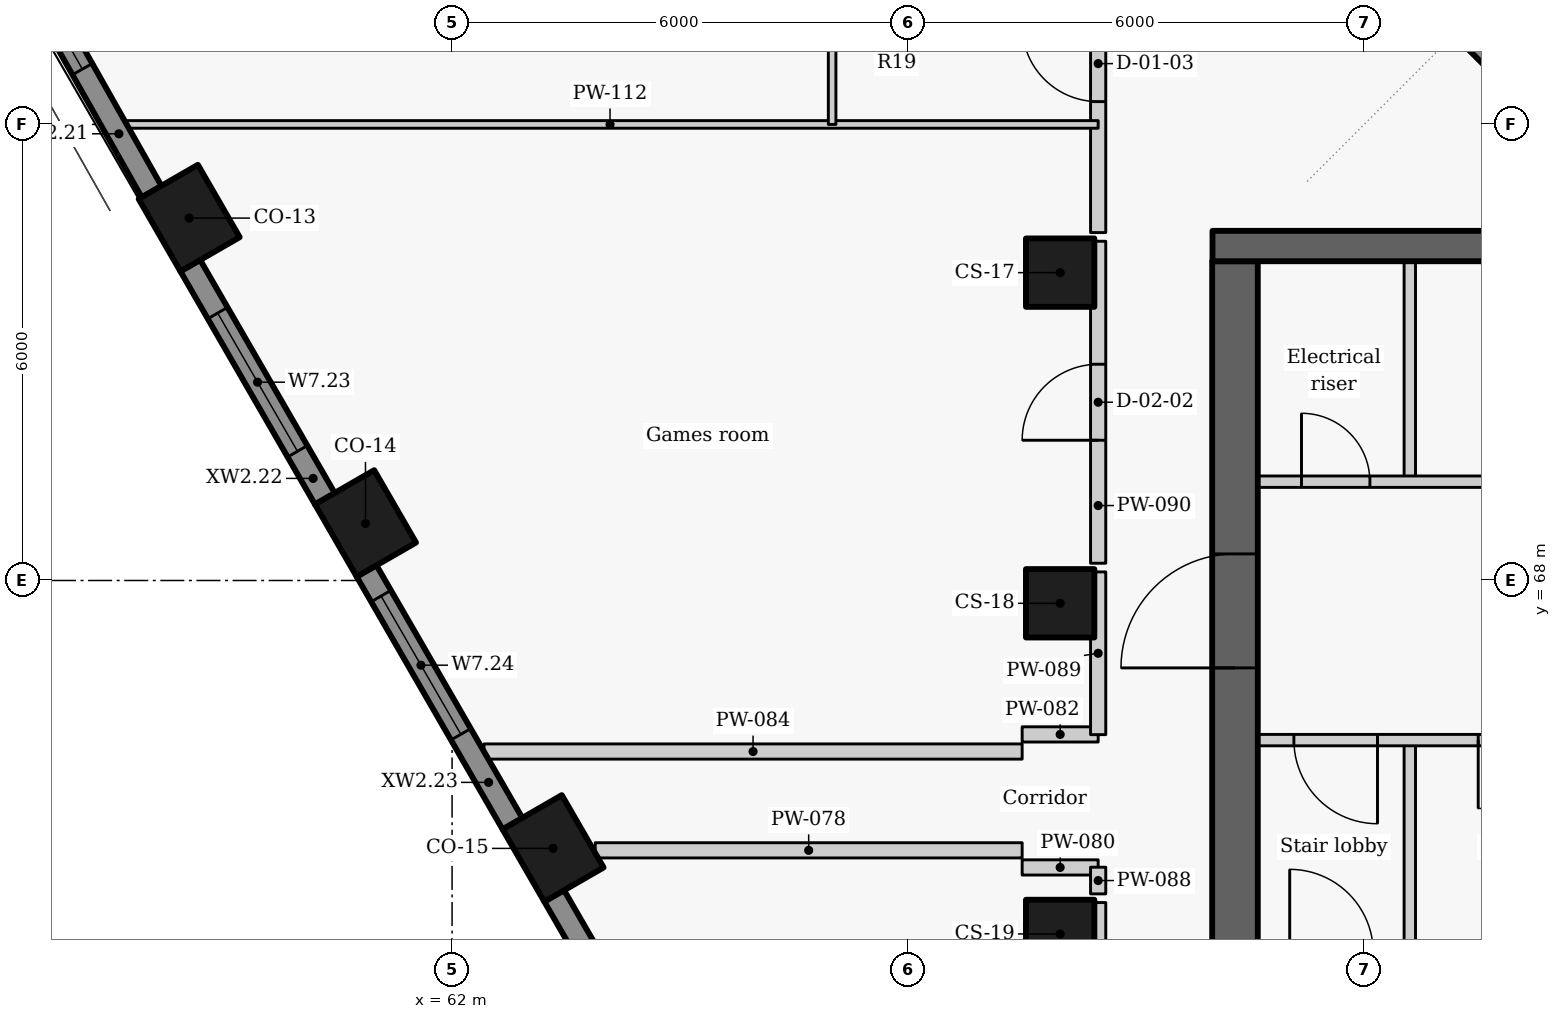
"""IFC4 building model, lengths in metres.
Left out: names, types, materials, properties, quantities, classifications, styles, units other than length and angle.
Written with IfcOpenShell. Run it as: python <this file> out.ifc"""

import sys

from ifc_helpers import new_model, si_unit, direction, frame, frame_2d, origin, origin_2d, place, context, subcontext, project, spatial, rectangle, extrude, element, fill, save


model = new_model("IFC4")
c1 = context("Model", 3, precision=1e-05, world=origin(), true_north=direction((0.0, 1.0)))
c2 = subcontext(c1, "Body", "Model", "MODEL_VIEW")
j1 = project(units=[si_unit("LENGTHUNIT", "METRE"), si_unit("PLANEANGLEUNIT", "RADIAN")], contexts=[c1])
p1 = place(None, origin())
s1 = spatial("IfcSite", under=j1, at=p1, CompositionType="ELEMENT")
p2 = place(p1, origin())
s2 = spatial("IfcBuilding", under=s1, at=p2, CompositionType="ELEMENT")
p3 = place(p2, frame((0.0, 0.0, 249.3)))
s3 = spatial("IfcBuildingStorey", under=s2, at=p3, CompositionType="ELEMENT", Elevation=249.3)
for number, where, z_axis, x_axis in (
    (1, (58.541, 72.768, 0.0), (0.0, 0.0, 1.0), (0.5, -0.866, 0.0)),
    (2, (60.861, 68.75, 0.0), (0.0, 0.0, 1.0), (0.5, -0.866, 0.0)),
    (3, (63.329, 64.475, 0.0), (0.0, 0.0, 1.0), (0.5, -0.866, 0.0)),
):
    element("IfcColumn", number, at=place(p3, frame(where, z_axis=z_axis, x_axis=x_axis)), inside=s3, PredefinedType="COLUMN", context=c2, shape_type="SweptSolid", body=[
        extrude(rectangle(XDim=1.1, YDim=0.9, at=origin_2d()), origin(), (0.0, 0.0, 1.0), 3.3),
    ])
for number, where, z_axis, x_axis in (
    (4, (70.0, 72.05, 0.0), (0.0, 0.0, 1.0), (0.0, -1.0, 0.0)),
    (5, (70.0, 67.7, 0.0), (0.0, 0.0, 1.0), (0.0, -1.0, 0.0)),
    (6, (70.0, 63.35, 0.0), (0.0, 0.0, 1.0), (0.0, -1.0, 0.0)),
):
    element("IfcColumn", number, at=place(p3, frame(where, z_axis=z_axis, x_axis=x_axis)), inside=s3, PredefinedType="COLUMN", context=c2, shape_type="SweptSolid", body=[
        extrude(rectangle(XDim=0.9, YDim=0.9, at=origin_2d()), origin(), (0.0, 0.0, 1.0), 3.3),
    ])
p4 = place(p3, frame((55.373, 77.846, 0.0), z_axis=(0.0, 0.0, 1.0), x_axis=(0.492080931903, -0.870549456641, 0.0)))
e7 = element("IfcWall", 7, at=p4, inside=s3, PredefinedType="SOLIDWALL", context=c2, shape_type="SweptSolid", body=[
    extrude(rectangle(XDim=5.437, YDim=0.3, at=frame_2d((2.718, 0.0))), origin(), (0.0, 0.0, 1.0), 2.425),
])
p5 = place(p4, frame((1.483, 0.0, 0.9)))
e8 = element("IfcOpeningElement", 8, at=p5, cuts=e7, PredefinedType="OPENING", context=c2, shape_type="SweptSolid", body=[
    extrude(rectangle(XDim=2.1, YDim=1.1, at=frame_2d((1.05, 0.55))), frame((0.0, 0.16, 0.0), z_axis=(0.0, -1.0, 0.0), x_axis=(1.0, 0.0, 0.0)), (0.0, 0.0, 1.0), 0.32),
])
p6 = place(p3, frame((58.554, 72.145, 0.0), z_axis=(0.0, 0.0, 1.0), x_axis=(0.500010404316, -0.866019396766, 0.0)))
e9 = element("IfcWall", 9, at=p6, inside=s3, PredefinedType="SOLIDWALL", context=c2, shape_type="SweptSolid", body=[
    extrude(rectangle(XDim=3.547, YDim=0.3, at=frame_2d((1.774, 0.0))), origin(), (0.0, 0.0, 1.0), 2.425),
])
p7 = place(p6, frame((0.723, 0.0, 0.9)))
e10 = element("IfcOpeningElement", 10, at=p7, cuts=e9, PredefinedType="OPENING", context=c2, shape_type="SweptSolid", body=[
    extrude(rectangle(XDim=2.1, YDim=1.1, at=frame_2d((1.05, 0.55))), frame((0.0, 0.16, 0.0), z_axis=(0.0, -1.0, 0.0), x_axis=(1.0, 0.0, 0.0)), (0.0, 0.0, 1.0), 0.32),
])
p8 = place(p3, frame((60.874, 68.127, 0.0), z_axis=(0.0, 0.0, 1.0), x_axis=(0.499984490703, -0.866034357896, 0.0)))
e11 = element("IfcWall", 11, at=p8, inside=s3, PredefinedType="SOLIDWALL", context=c2, shape_type="SweptSolid", body=[
    extrude(rectangle(XDim=3.844, YDim=0.3, at=frame_2d((1.922, 0.0))), origin(), (0.0, 0.0, 1.0), 2.425),
])
p9 = place(p8, frame((0.384, 0.0, 0.9)))
e12 = element("IfcOpeningElement", 12, at=p9, cuts=e11, PredefinedType="OPENING", context=c2, shape_type="SweptSolid", body=[
    extrude(rectangle(XDim=2.1, YDim=1.1, at=frame_2d((1.05, 0.55))), frame((0.0, 0.16, 0.0), z_axis=(0.0, -1.0, 0.0), x_axis=(1.0, 0.0, 0.0)), (0.0, 0.0, 1.0), 0.32),
])
p10 = place(p3, frame((63.342, 63.853, 0.0), z_axis=(0.0, 0.0, 1.0), x_axis=(0.500011218404, -0.866018926739, 0.0)))
e13 = element("IfcWall", 13, at=p10, inside=s3, PredefinedType="SOLIDWALL", context=c2, shape_type="SweptSolid", body=[
    extrude(rectangle(XDim=3.879, YDim=0.3, at=frame_2d((1.939, 0.0))), origin(), (0.0, 0.0, 1.0), 2.425),
])
p11 = place(p10, frame((0.878, 0.0, 0.9)))
e14 = element("IfcOpeningElement", 14, at=p11, cuts=e13, PredefinedType="OPENING", context=c2, shape_type="SweptSolid", body=[
    extrude(rectangle(XDim=2.1, YDim=1.1, at=frame_2d((1.05, 0.55))), frame((0.0, 0.16, 0.0), z_axis=(0.0, -1.0, 0.0), x_axis=(1.0, 0.0, 0.0)), (0.0, 0.0, 1.0), 0.32),
])
p12 = place(p3, frame((76.339, 74.194, 0.0), z_axis=(0.0, 0.0, 1.0), x_axis=(-0.707106781187, 0.707106781187, 0.0)))
e15 = element("IfcWall", 15, at=p12, inside=s3, PredefinedType="SOLIDWALL", context=c2, shape_type="SweptSolid", body=[
    extrude(rectangle(XDim=3.033, YDim=0.25, at=frame_2d((1.517, 0.0))), origin(), (0.0, 0.0, 1.0), 2.425),
])
p13 = place(p3, frame((74.6, 63.1, 0.0), z_axis=(0.0, 0.0, 1.0), x_axis=(0.0, 1.0, 0.0)))
e16 = element("IfcWall", 16, at=p13, inside=s3, PredefinedType="PARTITIONING", context=c2, shape_type="SweptSolid", body=[
    extrude(rectangle(XDim=2.8, YDim=0.15, at=frame_2d((1.4, 0.0))), origin(), (0.0, 0.0, 1.0), 3.025),
])
p14 = place(p3, frame((74.6, 69.3, 0.0), z_axis=(0.0, 0.0, 1.0), x_axis=(0.0, 1.0, 0.0)))
e17 = element("IfcWall", 17, at=p14, inside=s3, PredefinedType="PARTITIONING", context=c2, shape_type="SweptSolid", body=[
    extrude(rectangle(XDim=2.9, YDim=0.15, at=frame_2d((1.45, 0.0))), origin(), (0.0, 0.0, 1.0), 3.025),
])
p15 = place(p3, frame((72.0, 69.3, 0.0), z_axis=(0.0, 0.0, 1.0), x_axis=(1.0, 0.0, 0.0)))
e18 = element("IfcWall", 18, at=p15, inside=s3, PredefinedType="PARTITIONING", context=c2, shape_type="SweptSolid", body=[
    extrude(rectangle(XDim=13.4, YDim=0.15, at=frame_2d((6.7, 0.0))), origin(), (0.0, 0.0, 1.0), 3.025),
])
p16 = place(p15, frame((1.175, 0.0, 0.0)))
e19 = element("IfcOpeningElement", 19, at=p16, cuts=e18, PredefinedType="OPENING", context=c2, shape_type="SweptSolid", body=[
    extrude(rectangle(XDim=0.9, YDim=2.1, at=frame_2d((0.45, 1.05))), frame((0.0, 0.085, 0.0), z_axis=(0.0, -1.0, 0.0), x_axis=(1.0, 0.0, 0.0)), (0.0, 0.0, 1.0), 0.17),
])
p17 = place(p15, frame((4.85, 0.0, 0.0)))
e20 = element("IfcOpeningElement", 20, at=p17, cuts=e18, PredefinedType="OPENING", context=c2, shape_type="SweptSolid", body=[
    extrude(rectangle(XDim=0.9, YDim=2.1, at=frame_2d((0.45, 1.05))), frame((0.0, 0.085, 0.0), z_axis=(0.0, -1.0, 0.0), x_axis=(1.0, 0.0, 0.0)), (0.0, 0.0, 1.0), 0.17),
])
p18 = place(p15, frame((8.9, 0.0, 0.0)))
e21 = element("IfcOpeningElement", 21, at=p18, cuts=e18, PredefinedType="OPENING", context=c2, shape_type="SweptSolid", body=[
    extrude(rectangle(XDim=0.9, YDim=2.1, at=frame_2d((0.45, 1.05))), frame((0.0, 0.085, 0.0), z_axis=(0.0, -1.0, 0.0), x_axis=(1.0, 0.0, 0.0)), (0.0, 0.0, 1.0), 0.17),
])
p19 = place(p15, frame((11.6, 0.0, 0.0)))
e22 = element("IfcOpeningElement", 22, at=p19, cuts=e18, PredefinedType="OPENING", context=c2, shape_type="SweptSolid", body=[
    extrude(rectangle(XDim=0.9, YDim=2.1, at=frame_2d((0.45, 1.05))), frame((0.0, 0.085, 0.0), z_axis=(0.0, -1.0, 0.0), x_axis=(1.0, 0.0, 0.0)), (0.0, 0.0, 1.0), 0.17),
])
p20 = place(p3, frame((72.3, 63.1, -0.275), z_axis=(0.0, 0.0, 1.0), x_axis=(0.0, 1.0, 0.0)))
e23 = element("IfcWall", 23, at=p20, inside=s3, PredefinedType="SHEAR", context=c2, shape_type="SweptSolid", body=[
    extrude(rectangle(XDim=9.1, YDim=0.6, at=frame_2d((4.55, 0.0))), origin(), (0.0, 0.0, 1.0), 3.3),
])
p21 = place(p20, frame((3.75, 0.0, 0.275)))
e24 = element("IfcOpeningElement", 24, at=p21, cuts=e23, PredefinedType="OPENING", context=c2, shape_type="SweptSolid", body=[
    extrude(rectangle(XDim=1.5, YDim=2.1, at=frame_2d((0.75, 1.05))), frame((0.0, 0.31, 0.0), z_axis=(0.0, -1.0, 0.0), x_axis=(1.0, 0.0, 0.0)), (0.0, 0.0, 1.0), 0.62),
])
p22 = place(p3, frame((82.703, 65.9, 0.0), z_axis=(0.0, 0.0, 1.0), x_axis=(-1.0, 0.0, 0.0)))
e25 = element("IfcWall", 25, at=p22, inside=s3, PredefinedType="PARTITIONING", context=c2, shape_type="SweptSolid", body=[
    extrude(rectangle(XDim=10.703, YDim=0.15, at=frame_2d((5.352, 0.0))), origin(), (0.0, 0.0, 1.0), 3.025),
])
p23 = place(p22, frame((8.528, 0.0, 0.0)))
e26 = element("IfcOpeningElement", 26, at=p23, cuts=e25, PredefinedType="OPENING", context=c2, shape_type="SweptSolid", body=[
    extrude(rectangle(XDim=1.1, YDim=2.1, at=frame_2d((0.55, 1.05))), frame((0.0, 0.085, 0.0), z_axis=(0.0, -1.0, 0.0), x_axis=(1.0, 0.0, 0.0)), (0.0, 0.0, 1.0), 0.17),
])
p24 = place(p22, frame((6.303, 0.0, 0.0)))
e27 = element("IfcOpeningElement", 27, at=p24, cuts=e25, PredefinedType="OPENING", context=c2, shape_type="SweptSolid", body=[
    extrude(rectangle(XDim=0.9, YDim=2.1, at=frame_2d((0.45, 1.05))), frame((0.0, 0.085, 0.0), z_axis=(0.0, -1.0, 0.0), x_axis=(1.0, 0.0, 0.0)), (0.0, 0.0, 1.0), 0.17),
])
p25 = place(p22, frame((3.453, 0.0, 0.0)))
e28 = element("IfcOpeningElement", 28, at=p25, cuts=e25, PredefinedType="OPENING", context=c2, shape_type="SweptSolid", body=[
    extrude(rectangle(XDim=1.2, YDim=2.1, at=frame_2d((0.6, 1.05))), frame((0.0, 0.085, 0.0), z_axis=(0.0, -1.0, 0.0), x_axis=(1.0, 0.0, 0.0)), (0.0, 0.0, 1.0), 0.17),
])
p26 = place(p22, frame((0.903, 0.0, 0.0)))
e29 = element("IfcOpeningElement", 29, at=p26, cuts=e25, PredefinedType="OPENING", context=c2, shape_type="SweptSolid", body=[
    extrude(rectangle(XDim=0.9, YDim=2.1, at=frame_2d((0.45, 1.05))), frame((0.0, 0.085, 0.0), z_axis=(0.0, -1.0, 0.0), x_axis=(1.0, 0.0, 0.0)), (0.0, 0.0, 1.0), 0.17),
])
p27 = place(p3, frame((63.883, 64.45, 0.0), z_axis=(0.0, 0.0, 1.0), x_axis=(1.0, 0.0, 0.0)))
e30 = element("IfcWall", 30, at=p27, inside=s3, PredefinedType="PARTITIONING", context=c2, shape_type="SweptSolid", body=[
    extrude(rectangle(XDim=5.617, YDim=0.2, at=frame_2d((2.808, 0.0))), origin(), (0.0, 0.0, 1.0), 3.025),
])
for number, where, z_axis, x_axis in (
    (31, (69.5, 64.225, 0.0), (0.0, 0.0, 1.0), (1.0, 0.0, 0.0)),
    (32, (69.5, 65.975, 0.0), (0.0, 0.0, 1.0), (1.0, 0.0, 0.0)),
):
    element("IfcWall", number, at=place(p3, frame(where, z_axis=z_axis, x_axis=x_axis)), inside=s3, PredefinedType="PARTITIONING", context=c2, shape_type="SweptSolid", body=[
        extrude(rectangle(XDim=1.0, YDim=0.2, at=frame_2d((0.5, 0.0))), origin(), (0.0, 0.0, 1.0), 2.505),
    ])
p28 = place(p3, frame((62.42, 65.75, 0.0), z_axis=(0.0, 0.0, 1.0), x_axis=(1.0, 0.0, 0.0)))
e33 = element("IfcWall", 33, at=p28, inside=s3, PredefinedType="PARTITIONING", context=c2, shape_type="SweptSolid", body=[
    extrude(rectangle(XDim=7.08, YDim=0.2, at=frame_2d((3.54, 0.0))), origin(), (0.0, 0.0, 1.0), 2.405),
])
p29 = place(p3, frame((70.5, 59.527, 0.0), z_axis=(0.0, 0.0, 1.0), x_axis=(0.0, 1.0, 0.0)))
e34 = element("IfcWall", 34, at=p29, inside=s3, PredefinedType="PARTITIONING", context=c2, shape_type="SweptSolid", body=[
    extrude(rectangle(XDim=4.236, YDim=0.2, at=frame_2d((2.118, 0.0))), origin(), (0.0, 0.0, 1.0), 3.025),
])
p30 = place(p29, frame((1.618, 0.0, 0.0)))
e35 = element("IfcOpeningElement", 35, at=p30, cuts=e34, PredefinedType="OPENING", context=c2, shape_type="SweptSolid", body=[
    extrude(rectangle(XDim=1.0, YDim=2.1, at=frame_2d((0.5, 1.05))), frame((0.0, 0.11, 0.0), z_axis=(0.0, -1.0, 0.0), x_axis=(1.0, 0.0, 0.0)), (0.0, 0.0, 1.0), 0.22),
])
p31 = place(p3, frame((70.5, 63.877, 0.0), z_axis=(0.0, 0.0, 1.0), x_axis=(0.0, 1.0, 0.0)))
e36 = element("IfcWall", 36, at=p31, inside=s3, PredefinedType="PARTITIONING", context=c2, shape_type="SweptSolid", body=[
    extrude(rectangle(XDim=0.351, YDim=0.2, at=frame_2d((0.176, 0.0))), origin(), (0.0, 0.0, 1.0), 3.025),
])
p32 = place(p3, frame((70.5, 65.972, 0.0), z_axis=(0.0, 0.0, 1.0), x_axis=(0.0, 1.0, 0.0)))
e37 = element("IfcWall", 37, at=p32, inside=s3, PredefinedType="PARTITIONING", context=c2, shape_type="SweptSolid", body=[
    extrude(rectangle(XDim=2.141, YDim=0.2, at=frame_2d((1.071, 0.0))), origin(), (0.0, 0.0, 1.0), 3.025),
])
p33 = place(p3, frame((70.5, 68.227, 0.0), z_axis=(0.0, 0.0, 1.0), x_axis=(0.0, 1.0, 0.0)))
e38 = element("IfcWall", 38, at=p33, inside=s3, PredefinedType="PARTITIONING", context=c2, shape_type="SweptSolid", body=[
    extrude(rectangle(XDim=4.236, YDim=0.2, at=frame_2d((2.118, 0.0))), origin(), (0.0, 0.0, 1.0), 3.025),
])
p34 = place(p33, frame((1.618, 0.0, 0.0)))
e39 = element("IfcOpeningElement", 39, at=p34, cuts=e38, PredefinedType="OPENING", context=c2, shape_type="SweptSolid", body=[
    extrude(rectangle(XDim=1.0, YDim=2.1, at=frame_2d((0.5, 1.05))), frame((0.0, 0.11, 0.0), z_axis=(0.0, -1.0, 0.0), x_axis=(1.0, 0.0, 0.0)), (0.0, 0.0, 1.0), 0.22),
])
p35 = place(p3, frame((70.5, 72.577, 0.0), z_axis=(0.0, 0.0, 1.0), x_axis=(0.0, 1.0, 0.0)))
e40 = element("IfcWall", 40, at=p35, inside=s3, PredefinedType="PARTITIONING", context=c2, shape_type="SweptSolid", body=[
    extrude(rectangle(XDim=15.786, YDim=0.2, at=frame_2d((7.893, 0.0))), origin(), (0.0, 0.0, 1.0), 3.025),
])
p36 = place(p35, frame((1.723, 0.0, 0.0)))
e41 = element("IfcOpeningElement", 41, at=p36, cuts=e40, PredefinedType="OPENING", context=c2, shape_type="SweptSolid", body=[
    extrude(rectangle(XDim=1.0, YDim=2.1, at=frame_2d((0.5, 1.05))), frame((0.0, 0.11, 0.0), z_axis=(0.0, -1.0, 0.0), x_axis=(1.0, 0.0, 0.0)), (0.0, 0.0, 1.0), 0.22),
])
p37 = place(p35, frame((12.123, 0.0, 0.0)))
e42 = element("IfcOpeningElement", 42, at=p37, cuts=e40, PredefinedType="OPENING", context=c2, shape_type="SweptSolid", body=[
    extrude(rectangle(XDim=1.0, YDim=2.1, at=frame_2d((0.5, 1.05))), frame((0.0, 0.11, 0.0), z_axis=(0.0, -1.0, 0.0), x_axis=(1.0, 0.0, 0.0)), (0.0, 0.0, 1.0), 0.22),
])
p38 = place(p3, frame((57.656, 74.0, 0.0), z_axis=(0.0, 0.0, 1.0), x_axis=(1.0, 0.0, 0.0)))
e43 = element("IfcWall", 43, at=p38, inside=s3, PredefinedType="PARTITIONING", context=c2, shape_type="SweptSolid", body=[
    extrude(rectangle(XDim=12.844, YDim=0.1, at=frame_2d((6.422, 0.0))), origin(), (0.0, 0.0, 1.0), 2.405),
])
p39 = place(p3, frame((67.0, 74.0, 0.0), z_axis=(0.0, 0.0, 1.0), x_axis=(0.0, 1.0, 0.0)))
e44 = element("IfcWall", 44, at=p39, inside=s3, PredefinedType="PARTITIONING", context=c2, shape_type="SweptSolid", body=[
    extrude(rectangle(XDim=12.0, YDim=0.1, at=frame_2d((6.0, 0.0))), origin(), (0.0, 0.0, 1.0), 3.025),
])
p40 = place(p39, frame((2.55, 0.0, 0.0)))
e45 = element("IfcOpeningElement", 45, at=p40, cuts=e44, PredefinedType="OPENING", context=c2, shape_type="SweptSolid", body=[
    extrude(rectangle(XDim=0.9, YDim=2.1, at=frame_2d((0.45, 1.05))), frame((0.0, 0.06, 0.0), z_axis=(0.0, -1.0, 0.0), x_axis=(1.0, 0.0, 0.0)), (0.0, 0.0, 1.0), 0.12),
])
p41 = place(p39, frame((8.55, 0.0, 0.0)))
e46 = element("IfcOpeningElement", 46, at=p41, cuts=e44, PredefinedType="OPENING", context=c2, shape_type="SweptSolid", body=[
    extrude(rectangle(XDim=0.9, YDim=2.1, at=frame_2d((0.45, 1.05))), frame((0.0, 0.06, 0.0), z_axis=(0.0, -1.0, 0.0), x_axis=(1.0, 0.0, 0.0)), (0.0, 0.0, 1.0), 0.12),
])
p42 = place(p3, frame((72.004, 72.4, -0.275), z_axis=(0.0, 0.0, 1.0), x_axis=(1.0, 0.0, 0.0)))
e47 = element("IfcWall", 47, at=p42, inside=s3, PredefinedType="SHEAR", context=c2, shape_type="SweptSolid", body=[
    extrude(rectangle(XDim=15.992, YDim=0.4, at=frame_2d((7.996, 0.0))), origin(), (0.0, 0.0, 1.0), 3.3),
])
p43 = place(p5, origin())
e48 = element("IfcWindow", 48, at=p43, inside=s3, PartitioningType="SINGLE_PANEL", PredefinedType="WINDOW", context=c2, shape_type="SweptSolid", body=[
    extrude(rectangle(XDim=2.1, YDim=1.1, at=frame_2d((1.05, 0.55))), frame((0.0, 0.03, 0.0), z_axis=(0.0, -1.0, 0.0), x_axis=(1.0, 0.0, 0.0)), (0.0, 0.0, 1.0), 0.06),
])
fill(e8, e48)
p44 = place(p7, origin())
e49 = element("IfcWindow", 49, at=p44, inside=s3, PartitioningType="SINGLE_PANEL", PredefinedType="WINDOW", context=c2, shape_type="SweptSolid", body=[
    extrude(rectangle(XDim=2.1, YDim=1.1, at=frame_2d((1.05, 0.55))), frame((0.0, 0.03, 0.0), z_axis=(0.0, -1.0, 0.0), x_axis=(1.0, 0.0, 0.0)), (0.0, 0.0, 1.0), 0.06),
])
fill(e10, e49)
p45 = place(p9, origin())
e50 = element("IfcWindow", 50, at=p45, inside=s3, PartitioningType="SINGLE_PANEL", PredefinedType="WINDOW", context=c2, shape_type="SweptSolid", body=[
    extrude(rectangle(XDim=2.1, YDim=1.1, at=frame_2d((1.05, 0.55))), frame((0.0, 0.03, 0.0), z_axis=(0.0, -1.0, 0.0), x_axis=(1.0, 0.0, 0.0)), (0.0, 0.0, 1.0), 0.06),
])
fill(e12, e50)
p46 = place(p16, origin())
e51 = element("IfcDoor", 51, at=p46, inside=s3, OperationType="SINGLE_SWING_LEFT", PredefinedType="DOOR", context=c2, shape_type="SweptSolid", body=[
    extrude(rectangle(XDim=0.9, YDim=2.1, at=frame_2d((0.45, 1.05))), frame((0.0, 0.025, 0.0), z_axis=(0.0, -1.0, 0.0), x_axis=(1.0, 0.0, 0.0)), (0.0, 0.0, 1.0), 0.05),
])
fill(e19, e51)
p47 = place(p23, origin())
e52 = element("IfcDoor", 52, at=p47, inside=s3, OperationType="SINGLE_SWING_LEFT", PredefinedType="DOOR", context=c2, shape_type="SweptSolid", body=[
    extrude(rectangle(XDim=1.1, YDim=2.1, at=frame_2d((0.55, 1.05))), frame((0.0, 0.025, 0.0), z_axis=(0.0, -1.0, 0.0), x_axis=(1.0, 0.0, 0.0)), (0.0, 0.0, 1.0), 0.05),
])
fill(e26, e52)
p48 = place(p24, origin())
e53 = element("IfcDoor", 53, at=p48, inside=s3, OperationType="SINGLE_SWING_RIGHT", PredefinedType="DOOR", context=c2, shape_type="SweptSolid", body=[
    extrude(rectangle(XDim=0.9, YDim=2.1, at=frame_2d((0.45, 1.05))), frame((0.0, 0.025, 0.0), z_axis=(0.0, -1.0, 0.0), x_axis=(1.0, 0.0, 0.0)), (0.0, 0.0, 1.0), 0.05),
])
fill(e27, e53)
p49 = place(p34, origin())
e54 = element("IfcDoor", 54, at=p49, inside=s3, OperationType="SINGLE_SWING_LEFT", PredefinedType="DOOR", context=c2, shape_type="SweptSolid", body=[
    extrude(rectangle(XDim=1.0, YDim=2.1, at=frame_2d((0.5, 1.05))), frame((0.0, 0.025, 0.0), z_axis=(0.0, -1.0, 0.0), x_axis=(1.0, 0.0, 0.0)), (0.0, 0.0, 1.0), 0.05),
])
fill(e39, e54)
p50 = place(p36, origin())
e55 = element("IfcDoor", 55, at=p50, inside=s3, OperationType="SINGLE_SWING_RIGHT", PredefinedType="DOOR", context=c2, shape_type="SweptSolid", body=[
    extrude(rectangle(XDim=1.0, YDim=2.1, at=frame_2d((0.5, 1.05))), frame((0.0, 0.025, 0.0), z_axis=(0.0, -1.0, 0.0), x_axis=(1.0, 0.0, 0.0)), (0.0, 0.0, 1.0), 0.05),
])
fill(e41, e55)
p51 = place(p21, origin())
e56 = element("IfcDoor", 56, at=p51, inside=s3, OperationType="DOUBLE_DOOR_SINGLE_SWING", PredefinedType="DOOR", context=c2, shape_type="SweptSolid", body=[
    extrude(rectangle(XDim=1.5, YDim=2.1, at=frame_2d((0.75, 1.05))), frame((0.0, 0.025, 0.0), z_axis=(0.0, -1.0, 0.0), x_axis=(1.0, 0.0, 0.0)), (0.0, 0.0, 1.0), 0.05),
])
fill(e24, e56)
save(model, sys.argv[1])
